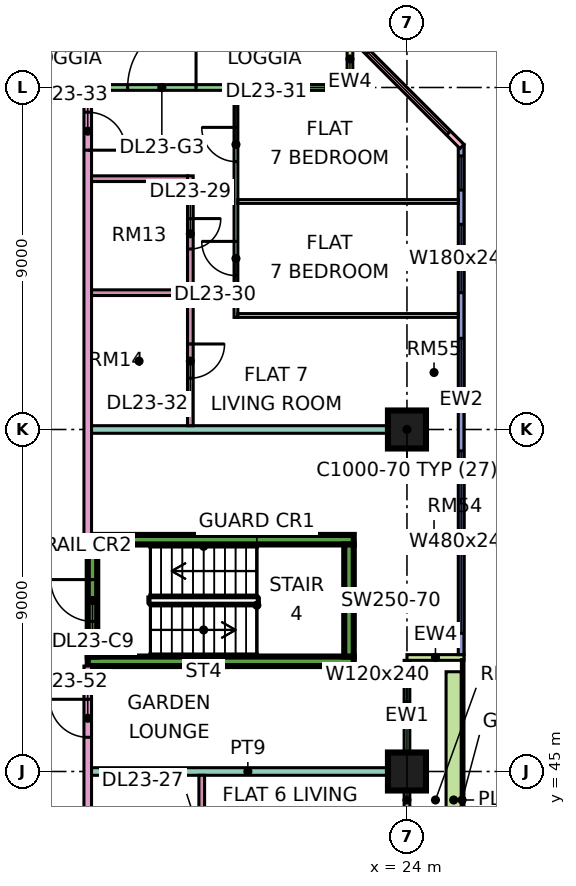
"""IFC4 building model, lengths in metres.
Left out: names, types, materials, properties, quantities, classifications, styles, units other than length and angle.
Written with IfcOpenShell. Run it as: python <this file> out.ifc"""

import sys

from ifc_helpers import new_model, si_unit, direction, frame, frame_2d, origin, origin_2d, place, context, subcontext, project, spatial, rectangle, extrude, element, fill, save


model = new_model("IFC4")
c1 = context("Model", 3, precision=1e-05, world=origin(), true_north=direction((0.0, 1.0)))
c2 = subcontext(c1, "Body", "Model", "MODEL_VIEW")
j1 = project(units=[si_unit("LENGTHUNIT", "METRE"), si_unit("PLANEANGLEUNIT", "RADIAN")], contexts=[c1])
p1 = place(None, origin())
s1 = spatial("IfcSite", under=j1, at=p1, CompositionType="ELEMENT")
p2 = place(p1, origin())
s2 = spatial("IfcBuilding", under=s1, at=p2, CompositionType="ELEMENT")
p3 = place(p2, frame((0.0, 0.0, 103.15)))
s3 = spatial("IfcBuildingStorey", under=s2, at=p3, CompositionType="ELEMENT", Elevation=103.15)
for number, where, z_axis, x_axis in (
    (1, (24.0, 45.0, 0.0), (0.0, 0.0, 1.0), (1.0, 0.0, 0.0)),
    (2, (24.0, 54.0, 0.0), (0.0, 0.0, 1.0), (1.0, 0.0, 0.0)),
):
    element("IfcColumn", number, at=place(p3, frame(where, z_axis=z_axis, x_axis=x_axis)), inside=s3, PredefinedType="COLUMN", context=c2, shape_type="SweptSolid", body=[
        extrude(rectangle(XDim=1.0, YDim=1.0, at=origin_2d()), origin(), (0.0, 0.0, 1.0), 3.75),
    ])
for number, where, z_axis, x_axis in (
    (3, (15.6, 47.9, 0.0), (0.0, 0.0, 1.0), (1.0, 0.0, 0.0)),
    (4, (15.6, 51.1, 0.0), (0.0, 0.0, 1.0), (1.0, 0.0, 0.0)),
):
    element("IfcWall", number, at=place(p3, frame(where, z_axis=z_axis, x_axis=x_axis)), inside=s3, PredefinedType="SHEAR", context=c2, shape_type="SweptSolid", body=[
        extrude(rectangle(XDim=7.0, YDim=0.25, at=frame_2d((3.5, 0.0))), origin(), (0.0, 0.0, 1.0), 3.75),
    ])
p4 = place(p3, frame((15.725, 48.025, 0.0), z_axis=(0.0, 0.0, 1.0), x_axis=(0.0, 1.0, 0.0)))
e5 = element("IfcWall", 5, at=p4, inside=s3, PredefinedType="SHEAR", context=c2, shape_type="SweptSolid", body=[
    extrude(rectangle(XDim=2.95, YDim=0.25, at=frame_2d((1.475, 0.0))), origin(), (0.0, 0.0, 1.0), 3.75),
])
p5 = place(p4, frame((0.925, 0.0, 0.0)))
e6 = element("IfcOpeningElement", 6, at=p5, cuts=e5, PredefinedType="OPENING", context=c2, shape_type="SweptSolid", body=[
    extrude(rectangle(XDim=1.1, YDim=2.2, at=frame_2d((0.55, 1.1))), frame((0.0, 0.135, 0.0), z_axis=(0.0, -1.0, 0.0), x_axis=(1.0, 0.0, 0.0)), (0.0, 0.0, 1.0), 0.27),
])
p6 = place(p3, frame((22.475, 48.025, 0.0), z_axis=(0.0, 0.0, 1.0), x_axis=(0.0, 1.0, 0.0)))
e7 = element("IfcWall", 7, at=p6, inside=s3, PredefinedType="SHEAR", context=c2, shape_type="SweptSolid", body=[
    extrude(rectangle(XDim=2.95, YDim=0.25, at=frame_2d((1.475, 0.0))), origin(), (0.0, 0.0, 1.0), 3.75),
])
p7 = place(p3, frame((24.0, 40.575, 0.0), z_axis=(0.0, 0.0, 1.0), x_axis=(0.0, 1.0, 0.0)))
e8 = element("IfcWall", 8, at=p7, inside=s3, PredefinedType="SOLIDWALL", context=c2, shape_type="SweptSolid", body=[
    extrude(rectangle(XDim=7.35, YDim=0.15, at=frame_2d((3.675, 0.0))), origin(), (0.0, 0.0, 1.0), 3.35),
])
p8 = place(p7, frame((0.262, 0.0, 0.45)))
e9 = element("IfcOpeningElement", 9, at=p8, cuts=e8, PredefinedType="OPENING", context=c2, shape_type="SweptSolid", body=[
    extrude(rectangle(XDim=0.9, YDim=2.4, at=frame_2d((0.45, 1.2))), frame((0.0, 0.085, 0.0), z_axis=(0.0, -1.0, 0.0), x_axis=(1.0, 0.0, 0.0)), (0.0, 0.0, 1.0), 0.17),
])
p9 = place(p7, frame((2.025, 0.0, 0.0)))
e10 = element("IfcOpeningElement", 10, at=p9, cuts=e8, PredefinedType="OPENING", context=c2, shape_type="SweptSolid", body=[
    extrude(rectangle(XDim=1.2, YDim=2.4, at=frame_2d((0.6, 1.2))), frame((0.0, 0.085, 0.0), z_axis=(0.0, -1.0, 0.0), x_axis=(1.0, 0.0, 0.0)), (0.0, 0.0, 1.0), 0.17),
])
p10 = place(p7, frame((5.587, 0.0, 0.45)))
e11 = element("IfcOpeningElement", 11, at=p10, cuts=e8, PredefinedType="OPENING", context=c2, shape_type="SweptSolid", body=[
    extrude(rectangle(XDim=1.2, YDim=2.4, at=frame_2d((0.6, 1.2))), frame((0.0, 0.085, 0.0), z_axis=(0.0, -1.0, 0.0), x_axis=(1.0, 0.0, 0.0)), (0.0, 0.0, 1.0), 0.17),
])
p11 = place(p3, frame((25.5, 48.0, 0.0), z_axis=(0.0, 0.0, 1.0), x_axis=(-1.0, 0.0, 0.0)))
e12 = element("IfcWall", 12, at=p11, inside=s3, PredefinedType="SOLIDWALL", context=c2, shape_type="SweptSolid", body=[
    extrude(rectangle(XDim=1.5, YDim=0.15, at=frame_2d((0.75, 0.0))), origin(), (0.0, 0.0, 1.0), 3.35),
])
p12 = place(p3, frame((25.425, 48.075, 0.0), z_axis=(0.0, 0.0, 1.0), x_axis=(0.0, 1.0, 0.0)))
e13 = element("IfcWall", 13, at=p12, inside=s3, PredefinedType="SOLIDWALL", context=c2, shape_type="SweptSolid", body=[
    extrude(rectangle(XDim=13.425, YDim=0.15, at=frame_2d((6.712, 0.0))), origin(), (0.0, 0.0, 1.0), 3.35),
])
p13 = place(p12, frame((0.562, 0.0, 0.45)))
e14 = element("IfcOpeningElement", 14, at=p13, cuts=e13, PredefinedType="OPENING", context=c2, shape_type="SweptSolid", body=[
    extrude(rectangle(XDim=4.8, YDim=2.4, at=frame_2d((2.4, 1.2))), frame((0.0, 0.085, 0.0), z_axis=(0.0, -1.0, 0.0), x_axis=(1.0, 0.0, 0.0)), (0.0, 0.0, 1.0), 0.17),
])
p14 = place(p12, frame((6.525, 0.0, 0.45)))
e15 = element("IfcOpeningElement", 15, at=p14, cuts=e13, PredefinedType="OPENING", context=c2, shape_type="SweptSolid", body=[
    extrude(rectangle(XDim=1.8, YDim=2.4, at=frame_2d((0.9, 1.2))), frame((0.0, 0.085, 0.0), z_axis=(0.0, -1.0, 0.0), x_axis=(1.0, 0.0, 0.0)), (0.0, 0.0, 1.0), 0.17),
])
p15 = place(p12, frame((9.525, 0.0, 0.45)))
e16 = element("IfcOpeningElement", 16, at=p15, cuts=e13, PredefinedType="OPENING", context=c2, shape_type="SweptSolid", body=[
    extrude(rectangle(XDim=1.8, YDim=2.4, at=frame_2d((0.9, 1.2))), frame((0.0, 0.085, 0.0), z_axis=(0.0, -1.0, 0.0), x_axis=(1.0, 0.0, 0.0)), (0.0, 0.0, 1.0), 0.17),
])
p16 = place(p12, frame((12.225, 0.0, 0.45)))
e17 = element("IfcOpeningElement", 17, at=p16, cuts=e13, PredefinedType="OPENING", context=c2, shape_type="SweptSolid", body=[
    extrude(rectangle(XDim=0.9, YDim=2.4, at=frame_2d((0.45, 1.2))), frame((0.0, 0.085, 0.0), z_axis=(0.0, -1.0, 0.0), x_axis=(1.0, 0.0, 0.0)), (0.0, 0.0, 1.0), 0.17),
])
p17 = place(p3, frame((25.447, 61.447, 0.0), z_axis=(0.0, 0.0, 1.0), x_axis=(-0.707106781187, 0.707106781187, 0.0)))
e18 = element("IfcWall", 18, at=p17, inside=s3, PredefinedType="SOLIDWALL", context=c2, shape_type="SweptSolid", body=[
    extrude(rectangle(XDim=4.243, YDim=0.15, at=frame_2d((2.121, 0.0))), origin(), (0.0, 0.0, 1.0), 3.35),
])
p18 = place(p17, frame((0.498, 0.0, 0.45)))
e19 = element("IfcOpeningElement", 19, at=p18, cuts=e18, PredefinedType="OPENING", context=c2, shape_type="SweptSolid", body=[
    extrude(rectangle(XDim=3.0, YDim=2.4, at=frame_2d((1.5, 1.2))), frame((0.0, 0.085, 0.0), z_axis=(0.0, -1.0, 0.0), x_axis=(1.0, 0.0, 0.0)), (0.0, 0.0, 1.0), 0.17),
])
p19 = place(p3, frame((22.425, 63.0, 0.0), z_axis=(0.0, 0.0, 1.0), x_axis=(-1.0, 0.0, 0.0)))
e20 = element("IfcWall", 20, at=p19, inside=s3, PredefinedType="SOLIDWALL", context=c2, shape_type="SweptSolid", body=[
    extrude(rectangle(XDim=10.35, YDim=0.15, at=frame_2d((5.175, 0.0))), origin(), (0.0, 0.0, 1.0), 3.35),
])
p20 = place(p19, frame((0.562, 0.0, 0.45)))
e21 = element("IfcOpeningElement", 21, at=p20, cuts=e20, PredefinedType="OPENING", context=c2, shape_type="SweptSolid", body=[
    extrude(rectangle(XDim=1.8, YDim=2.4, at=frame_2d((0.9, 1.2))), frame((0.0, 0.085, 0.0), z_axis=(0.0, -1.0, 0.0), x_axis=(1.0, 0.0, 0.0)), (0.0, 0.0, 1.0), 0.17),
])
p21 = place(p19, frame((3.975, 0.0, 0.0)))
e22 = element("IfcOpeningElement", 22, at=p21, cuts=e20, PredefinedType="OPENING", context=c2, shape_type="SweptSolid", body=[
    extrude(rectangle(XDim=1.8, YDim=2.4, at=frame_2d((0.9, 1.2))), frame((0.0, 0.085, 0.0), z_axis=(0.0, -1.0, 0.0), x_axis=(1.0, 0.0, 0.0)), (0.0, 0.0, 1.0), 0.17),
])
p22 = place(p3, frame((22.5, 64.5, 0.0), z_axis=(0.0, 0.0, 1.0), x_axis=(0.0, -1.0, 0.0)))
e23 = element("IfcWall", 23, at=p22, inside=s3, PredefinedType="SOLIDWALL", context=c2, shape_type="SweptSolid", body=[
    extrude(rectangle(XDim=1.5, YDim=0.15, at=frame_2d((0.75, 0.0))), origin(), (0.0, 0.0, 1.0), 3.35),
])
p23 = place(p3, frame((25.229, 40.875, 0.0), z_axis=(0.0, 0.0, 1.0), x_axis=(0.0, 1.0, 0.0)))
e24 = element("IfcWall", 24, at=p23, inside=s3, PredefinedType="SOLIDWALL", context=c2, shape_type="SweptSolid", body=[
    extrude(rectangle(XDim=6.75, YDim=0.4, at=frame_2d((3.375, 0.0))), origin(), (0.0, 0.0, 1.0), 0.7),
])
p24 = place(p3, frame((15.6, 20.0, 0.0), z_axis=(0.0, 0.0, 1.0), x_axis=(0.0, 1.0, 0.0)))
e25 = element("IfcWall", 25, at=p24, inside=s3, PredefinedType="PARTITIONING", context=c2, shape_type="SweptSolid", body=[
    extrude(rectangle(XDim=27.775, YDim=0.2, at=frame_2d((13.887, 0.0))), origin(), (0.0, 0.0, 1.0), 3.35),
])
p25 = place(p24, frame((5.95, 0.0, 0.0)))
e26 = element("IfcOpeningElement", 26, at=p25, cuts=e25, PredefinedType="OPENING", context=c2, shape_type="SweptSolid", body=[
    extrude(rectangle(XDim=1.0, YDim=2.1, at=frame_2d((0.5, 1.05))), frame((0.0, 0.11, 0.0), z_axis=(0.0, -1.0, 0.0), x_axis=(1.0, 0.0, 0.0)), (0.0, 0.0, 1.0), 0.22),
])
p26 = place(p24, frame((12.0, 0.0, 0.0)))
e27 = element("IfcOpeningElement", 27, at=p26, cuts=e25, PredefinedType="OPENING", context=c2, shape_type="SweptSolid", body=[
    extrude(rectangle(XDim=1.0, YDim=2.1, at=frame_2d((0.5, 1.05))), frame((0.0, 0.11, 0.0), z_axis=(0.0, -1.0, 0.0), x_axis=(1.0, 0.0, 0.0)), (0.0, 0.0, 1.0), 0.22),
])
p27 = place(p24, frame((17.05, 0.0, 0.0)))
e28 = element("IfcOpeningElement", 28, at=p27, cuts=e25, PredefinedType="OPENING", context=c2, shape_type="SweptSolid", body=[
    extrude(rectangle(XDim=1.0, YDim=2.1, at=frame_2d((0.5, 1.05))), frame((0.0, 0.11, 0.0), z_axis=(0.0, -1.0, 0.0), x_axis=(1.0, 0.0, 0.0)), (0.0, 0.0, 1.0), 0.22),
])
p28 = place(p24, frame((1.15, 0.0, 0.0)))
e29 = element("IfcOpeningElement", 29, at=p28, cuts=e25, PredefinedType="OPENING", context=c2, shape_type="SweptSolid", body=[
    extrude(rectangle(XDim=1.8, YDim=2.1, at=frame_2d((0.9, 1.05))), frame((0.0, 0.11, 0.0), z_axis=(0.0, -1.0, 0.0), x_axis=(1.0, 0.0, 0.0)), (0.0, 0.0, 1.0), 0.22),
])
p29 = place(p24, frame((25.9, 0.0, 0.0)))
e30 = element("IfcOpeningElement", 30, at=p29, cuts=e25, PredefinedType="OPENING", context=c2, shape_type="SweptSolid", body=[
    extrude(rectangle(XDim=1.0, YDim=2.1, at=frame_2d((0.5, 1.05))), frame((0.0, 0.11, 0.0), z_axis=(0.0, -1.0, 0.0), x_axis=(1.0, 0.0, 0.0)), (0.0, 0.0, 1.0), 0.22),
])
p30 = place(p3, frame((15.6, 51.225, 0.0), z_axis=(0.0, 0.0, 1.0), x_axis=(0.0, 1.0, 0.0)))
e31 = element("IfcWall", 31, at=p30, inside=s3, PredefinedType="PARTITIONING", context=c2, shape_type="SweptSolid", body=[
    extrude(rectangle(XDim=11.701, YDim=0.2, at=frame_2d((5.851, 0.0))), origin(), (0.0, 0.0, 1.0), 3.35),
])
p31 = place(p30, frame((10.125, 0.0, 0.0)))
e32 = element("IfcOpeningElement", 32, at=p31, cuts=e31, PredefinedType="OPENING", context=c2, shape_type="SweptSolid", body=[
    extrude(rectangle(XDim=1.0, YDim=2.1, at=frame_2d((0.5, 1.05))), frame((0.0, 0.11, 0.0), z_axis=(0.0, -1.0, 0.0), x_axis=(1.0, 0.0, 0.0)), (0.0, 0.0, 1.0), 0.22),
])
p32 = place(p3, frame((15.7, 45.0, 0.0), z_axis=(0.0, 0.0, 1.0), x_axis=(1.0, 0.0, 0.0)))
e33 = element("IfcWall", 33, at=p32, inside=s3, PredefinedType="PARTITIONING", context=c2, shape_type="SweptSolid", body=[
    extrude(rectangle(XDim=8.226, YDim=0.2, at=frame_2d((4.113, 0.0))), origin(), (0.0, 0.0, 1.0), 3.35),
])
p33 = place(p3, frame((15.7, 54.0, 0.0), z_axis=(0.0, 0.0, 1.0), x_axis=(1.0, 0.0, 0.0)))
e34 = element("IfcWall", 34, at=p33, inside=s3, PredefinedType="PARTITIONING", context=c2, shape_type="SweptSolid", body=[
    extrude(rectangle(XDim=8.3, YDim=0.2, at=frame_2d((4.15, 0.0))), origin(), (0.0, 0.0, 1.0), 3.35),
])
for number, where, z_axis, x_axis in (
    (35, (15.7, 57.6, 0.0), (0.0, 0.0, 1.0), (1.0, 0.0, 0.0)),
    (36, (15.7, 60.6, 0.0), (0.0, 0.0, 1.0), (1.0, 0.0, 0.0)),
):
    element("IfcWall", number, at=place(p3, frame(where, z_axis=z_axis, x_axis=x_axis)), inside=s3, PredefinedType="PARTITIONING", context=c2, shape_type="SweptSolid", body=[
        extrude(rectangle(XDim=2.525, YDim=0.15, at=frame_2d((1.263, 0.0))), origin(), (0.0, 0.0, 1.0), 3.35),
    ])
p34 = place(p3, frame((18.3, 54.1, 0.0), z_axis=(0.0, 0.0, 1.0), x_axis=(0.0, 1.0, 0.0)))
e37 = element("IfcWall", 37, at=p34, inside=s3, PredefinedType="PARTITIONING", context=c2, shape_type="SweptSolid", body=[
    extrude(rectangle(XDim=6.575, YDim=0.15, at=frame_2d((3.288, 0.0))), origin(), (0.0, 0.0, 1.0), 3.35),
])
p35 = place(p34, frame((4.65, 0.0, 0.0)))
e38 = element("IfcOpeningElement", 38, at=p35, cuts=e37, PredefinedType="OPENING", context=c2, shape_type="SweptSolid", body=[
    extrude(rectangle(XDim=0.8, YDim=2.1, at=frame_2d((0.4, 1.05))), frame((0.0, 0.085, 0.0), z_axis=(0.0, -1.0, 0.0), x_axis=(1.0, 0.0, 0.0)), (0.0, 0.0, 1.0), 0.17),
])
p36 = place(p34, frame((1.25, 0.0, 0.0)))
e39 = element("IfcOpeningElement", 39, at=p36, cuts=e37, PredefinedType="OPENING", context=c2, shape_type="SweptSolid", body=[
    extrude(rectangle(XDim=0.9, YDim=2.1, at=frame_2d((0.45, 1.05))), frame((0.0, 0.085, 0.0), z_axis=(0.0, -1.0, 0.0), x_axis=(1.0, 0.0, 0.0)), (0.0, 0.0, 1.0), 0.17),
])
p37 = place(p3, frame((18.6, 38.925, 0.0), z_axis=(0.0, 0.0, 1.0), x_axis=(0.0, 1.0, 0.0)))
e40 = element("IfcWall", 40, at=p37, inside=s3, PredefinedType="PARTITIONING", context=c2, shape_type="SweptSolid", body=[
    extrude(rectangle(XDim=5.975, YDim=0.15, at=frame_2d((2.987, 0.0))), origin(), (0.0, 0.0, 1.0), 3.35),
])
p38 = place(p37, frame((0.925, 0.0, 0.0)))
e41 = element("IfcOpeningElement", 41, at=p38, cuts=e40, PredefinedType="OPENING", context=c2, shape_type="SweptSolid", body=[
    extrude(rectangle(XDim=0.8, YDim=2.1, at=frame_2d((0.4, 1.05))), frame((0.0, 0.085, 0.0), z_axis=(0.0, -1.0, 0.0), x_axis=(1.0, 0.0, 0.0)), (0.0, 0.0, 1.0), 0.17),
])
p39 = place(p37, frame((3.825, 0.0, 0.0)))
e42 = element("IfcOpeningElement", 42, at=p39, cuts=e40, PredefinedType="OPENING", context=c2, shape_type="SweptSolid", body=[
    extrude(rectangle(XDim=0.9, YDim=2.1, at=frame_2d((0.45, 1.05))), frame((0.0, 0.085, 0.0), z_axis=(0.0, -1.0, 0.0), x_axis=(1.0, 0.0, 0.0)), (0.0, 0.0, 1.0), 0.17),
])
p40 = place(p3, frame((19.5, 56.95, 0.0), z_axis=(0.0, 0.0, 1.0), x_axis=(0.0, 1.0, 0.0)))
e43 = element("IfcWall", 43, at=p40, inside=s3, PredefinedType="PARTITIONING", context=c2, shape_type="SweptSolid", body=[
    extrude(rectangle(XDim=5.976, YDim=0.1, at=frame_2d((2.988, 0.0))), origin(), (0.0, 0.0, 1.0), 3.35),
])
p41 = place(p40, frame((1.1, 0.0, 0.0)))
e44 = element("IfcOpeningElement", 44, at=p41, cuts=e43, PredefinedType="OPENING", context=c2, shape_type="SweptSolid", body=[
    extrude(rectangle(XDim=0.9, YDim=2.1, at=frame_2d((0.45, 1.05))), frame((0.0, 0.06, 0.0), z_axis=(0.0, -1.0, 0.0), x_axis=(1.0, 0.0, 0.0)), (0.0, 0.0, 1.0), 0.12),
])
p42 = place(p40, frame((4.1, 0.0, 0.0)))
e45 = element("IfcOpeningElement", 45, at=p42, cuts=e43, PredefinedType="OPENING", context=c2, shape_type="SweptSolid", body=[
    extrude(rectangle(XDim=0.9, YDim=2.1, at=frame_2d((0.45, 1.05))), frame((0.0, 0.06, 0.0), z_axis=(0.0, -1.0, 0.0), x_axis=(1.0, 0.0, 0.0)), (0.0, 0.0, 1.0), 0.12),
])
p43 = place(p3, frame((19.55, 57.0, 0.0), z_axis=(0.0, 0.0, 1.0), x_axis=(1.0, 0.0, 0.0)))
e46 = element("IfcWall", 46, at=p43, inside=s3, PredefinedType="PARTITIONING", context=c2, shape_type="SweptSolid", body=[
    extrude(rectangle(XDim=5.8, YDim=0.1, at=frame_2d((2.9, 0.0))), origin(), (0.0, 0.0, 1.0), 3.35),
])
p44 = place(p3, frame((19.55, 60.0, 0.0), z_axis=(0.0, 0.0, 1.0), x_axis=(1.0, 0.0, 0.0)))
e47 = element("IfcWall", 47, at=p44, inside=s3, PredefinedType="PARTITIONING", context=c2, shape_type="SweptSolid", body=[
    extrude(rectangle(XDim=5.801, YDim=0.1, at=frame_2d((2.9, 0.0))), origin(), (0.0, 0.0, 1.0), 3.35),
])
p45 = place(p10, origin())
e48 = element("IfcWindow", 48, at=p45, inside=s3, PartitioningType="SINGLE_PANEL", PredefinedType="WINDOW", context=c2, shape_type="SweptSolid", body=[
    extrude(rectangle(XDim=1.2, YDim=2.4, at=frame_2d((0.6, 1.2))), frame((0.0, 0.03, 0.0), z_axis=(0.0, -1.0, 0.0), x_axis=(1.0, 0.0, 0.0)), (0.0, 0.0, 1.0), 0.06),
])
fill(e11, e48)
p46 = place(p13, origin())
e49 = element("IfcWindow", 49, at=p46, inside=s3, PartitioningType="SINGLE_PANEL", PredefinedType="WINDOW", context=c2, shape_type="SweptSolid", body=[
    extrude(rectangle(XDim=4.8, YDim=2.4, at=frame_2d((2.4, 1.2))), frame((0.0, 0.03, 0.0), z_axis=(0.0, -1.0, 0.0), x_axis=(1.0, 0.0, 0.0)), (0.0, 0.0, 1.0), 0.06),
])
fill(e14, e49)
p47 = place(p14, origin())
e50 = element("IfcWindow", 50, at=p47, inside=s3, PartitioningType="SINGLE_PANEL", PredefinedType="WINDOW", context=c2, shape_type="SweptSolid", body=[
    extrude(rectangle(XDim=1.8, YDim=2.4, at=frame_2d((0.9, 1.2))), frame((0.0, 0.03, 0.0), z_axis=(0.0, -1.0, 0.0), x_axis=(1.0, 0.0, 0.0)), (0.0, 0.0, 1.0), 0.06),
])
fill(e15, e50)
p48 = place(p15, origin())
e51 = element("IfcWindow", 51, at=p48, inside=s3, PartitioningType="SINGLE_PANEL", PredefinedType="WINDOW", context=c2, shape_type="SweptSolid", body=[
    extrude(rectangle(XDim=1.8, YDim=2.4, at=frame_2d((0.9, 1.2))), frame((0.0, 0.03, 0.0), z_axis=(0.0, -1.0, 0.0), x_axis=(1.0, 0.0, 0.0)), (0.0, 0.0, 1.0), 0.06),
])
fill(e16, e51)
p49 = place(p16, origin())
e52 = element("IfcWindow", 52, at=p49, inside=s3, PartitioningType="SINGLE_PANEL", PredefinedType="WINDOW", context=c2, shape_type="SweptSolid", body=[
    extrude(rectangle(XDim=0.9, YDim=2.4, at=frame_2d((0.45, 1.2))), frame((0.0, 0.03, 0.0), z_axis=(0.0, -1.0, 0.0), x_axis=(1.0, 0.0, 0.0)), (0.0, 0.0, 1.0), 0.06),
])
fill(e17, e52)
p50 = place(p18, origin())
e53 = element("IfcWindow", 53, at=p50, inside=s3, PartitioningType="SINGLE_PANEL", PredefinedType="WINDOW", context=c2, shape_type="SweptSolid", body=[
    extrude(rectangle(XDim=3.0, YDim=2.4, at=frame_2d((1.5, 1.2))), frame((0.0, 0.03, 0.0), z_axis=(0.0, -1.0, 0.0), x_axis=(1.0, 0.0, 0.0)), (0.0, 0.0, 1.0), 0.06),
])
fill(e19, e53)
p51 = place(p20, origin())
e54 = element("IfcWindow", 54, at=p51, inside=s3, PartitioningType="SINGLE_PANEL", PredefinedType="WINDOW", context=c2, shape_type="SweptSolid", body=[
    extrude(rectangle(XDim=1.8, YDim=2.4, at=frame_2d((0.9, 1.2))), frame((0.0, 0.03, 0.0), z_axis=(0.0, -1.0, 0.0), x_axis=(1.0, 0.0, 0.0)), (0.0, 0.0, 1.0), 0.06),
])
fill(e21, e54)
p52 = place(p21, frame((1.8, 0.0, 0.0), z_axis=(0.0, 0.0, 1.0), x_axis=(-1.0, 0.0, 0.0)))
e55 = element("IfcDoor", 55, at=p52, inside=s3, OperationType="DOUBLE_DOOR_SINGLE_SWING", PredefinedType="DOOR", context=c2, shape_type="SweptSolid", body=[
    extrude(rectangle(XDim=1.8, YDim=2.4, at=frame_2d((0.9, 1.2))), frame((0.0, 0.025, 0.0), z_axis=(0.0, -1.0, 0.0), x_axis=(1.0, 0.0, 0.0)), (0.0, 0.0, 1.0), 0.05),
])
fill(e22, e55)
p53 = place(p5, frame((1.1, 0.0, 0.0), z_axis=(0.0, 0.0, 1.0), x_axis=(-1.0, 0.0, 0.0)))
e56 = element("IfcDoor", 56, at=p53, inside=s3, OperationType="SINGLE_SWING_RIGHT", PredefinedType="DOOR", context=c2, shape_type="SweptSolid", body=[
    extrude(rectangle(XDim=1.1, YDim=2.2, at=frame_2d((0.55, 1.1))), frame((0.0, 0.025, 0.0), z_axis=(0.0, -1.0, 0.0), x_axis=(1.0, 0.0, 0.0)), (0.0, 0.0, 1.0), 0.05),
])
fill(e6, e56)
p54 = place(p35, origin())
e57 = element("IfcDoor", 57, at=p54, inside=s3, OperationType="SINGLE_SWING_RIGHT", PredefinedType="DOOR", context=c2, shape_type="SweptSolid", body=[
    extrude(rectangle(XDim=0.8, YDim=2.1, at=frame_2d((0.4, 1.05))), frame((0.0, 0.025, 0.0), z_axis=(0.0, -1.0, 0.0), x_axis=(1.0, 0.0, 0.0)), (0.0, 0.0, 1.0), 0.05),
])
fill(e38, e57)
p55 = place(p41, frame((0.9, 0.0, 0.0), z_axis=(0.0, 0.0, 1.0), x_axis=(-1.0, 0.0, 0.0)))
e58 = element("IfcDoor", 58, at=p55, inside=s3, OperationType="SINGLE_SWING_RIGHT", PredefinedType="DOOR", context=c2, shape_type="SweptSolid", body=[
    extrude(rectangle(XDim=0.9, YDim=2.1, at=frame_2d((0.45, 1.05))), frame((0.0, 0.025, 0.0), z_axis=(0.0, -1.0, 0.0), x_axis=(1.0, 0.0, 0.0)), (0.0, 0.0, 1.0), 0.05),
])
fill(e44, e58)
p56 = place(p42, frame((0.9, 0.0, 0.0), z_axis=(0.0, 0.0, 1.0), x_axis=(-1.0, 0.0, 0.0)))
e59 = element("IfcDoor", 59, at=p56, inside=s3, OperationType="SINGLE_SWING_RIGHT", PredefinedType="DOOR", context=c2, shape_type="SweptSolid", body=[
    extrude(rectangle(XDim=0.9, YDim=2.1, at=frame_2d((0.45, 1.05))), frame((0.0, 0.025, 0.0), z_axis=(0.0, -1.0, 0.0), x_axis=(1.0, 0.0, 0.0)), (0.0, 0.0, 1.0), 0.05),
])
fill(e45, e59)
p57 = place(p36, origin())
e60 = element("IfcDoor", 60, at=p57, inside=s3, OperationType="SINGLE_SWING_RIGHT", PredefinedType="DOOR", context=c2, shape_type="SweptSolid", body=[
    extrude(rectangle(XDim=0.9, YDim=2.1, at=frame_2d((0.45, 1.05))), frame((0.0, 0.025, 0.0), z_axis=(0.0, -1.0, 0.0), x_axis=(1.0, 0.0, 0.0)), (0.0, 0.0, 1.0), 0.05),
])
fill(e39, e60)
p58 = place(p31, frame((1.0, 0.0, 0.0), z_axis=(0.0, 0.0, 1.0), x_axis=(-1.0, 0.0, 0.0)))
e61 = element("IfcDoor", 61, at=p58, inside=s3, OperationType="SINGLE_SWING_LEFT", PredefinedType="DOOR", context=c2, shape_type="SweptSolid", body=[
    extrude(rectangle(XDim=1.0, YDim=2.1, at=frame_2d((0.5, 1.05))), frame((0.0, 0.025, 0.0), z_axis=(0.0, -1.0, 0.0), x_axis=(1.0, 0.0, 0.0)), (0.0, 0.0, 1.0), 0.05),
])
fill(e32, e61)
p59 = place(p29, frame((1.0, 0.0, 0.0), z_axis=(0.0, 0.0, 1.0), x_axis=(-1.0, 0.0, 0.0)))
e62 = element("IfcDoor", 62, at=p59, inside=s3, OperationType="SINGLE_SWING_RIGHT", PredefinedType="DOOR", context=c2, shape_type="SweptSolid", body=[
    extrude(rectangle(XDim=1.0, YDim=2.1, at=frame_2d((0.5, 1.05))), frame((0.0, 0.025, 0.0), z_axis=(0.0, -1.0, 0.0), x_axis=(1.0, 0.0, 0.0)), (0.0, 0.0, 1.0), 0.05),
])
fill(e30, e62)
save(model, sys.argv[1])
